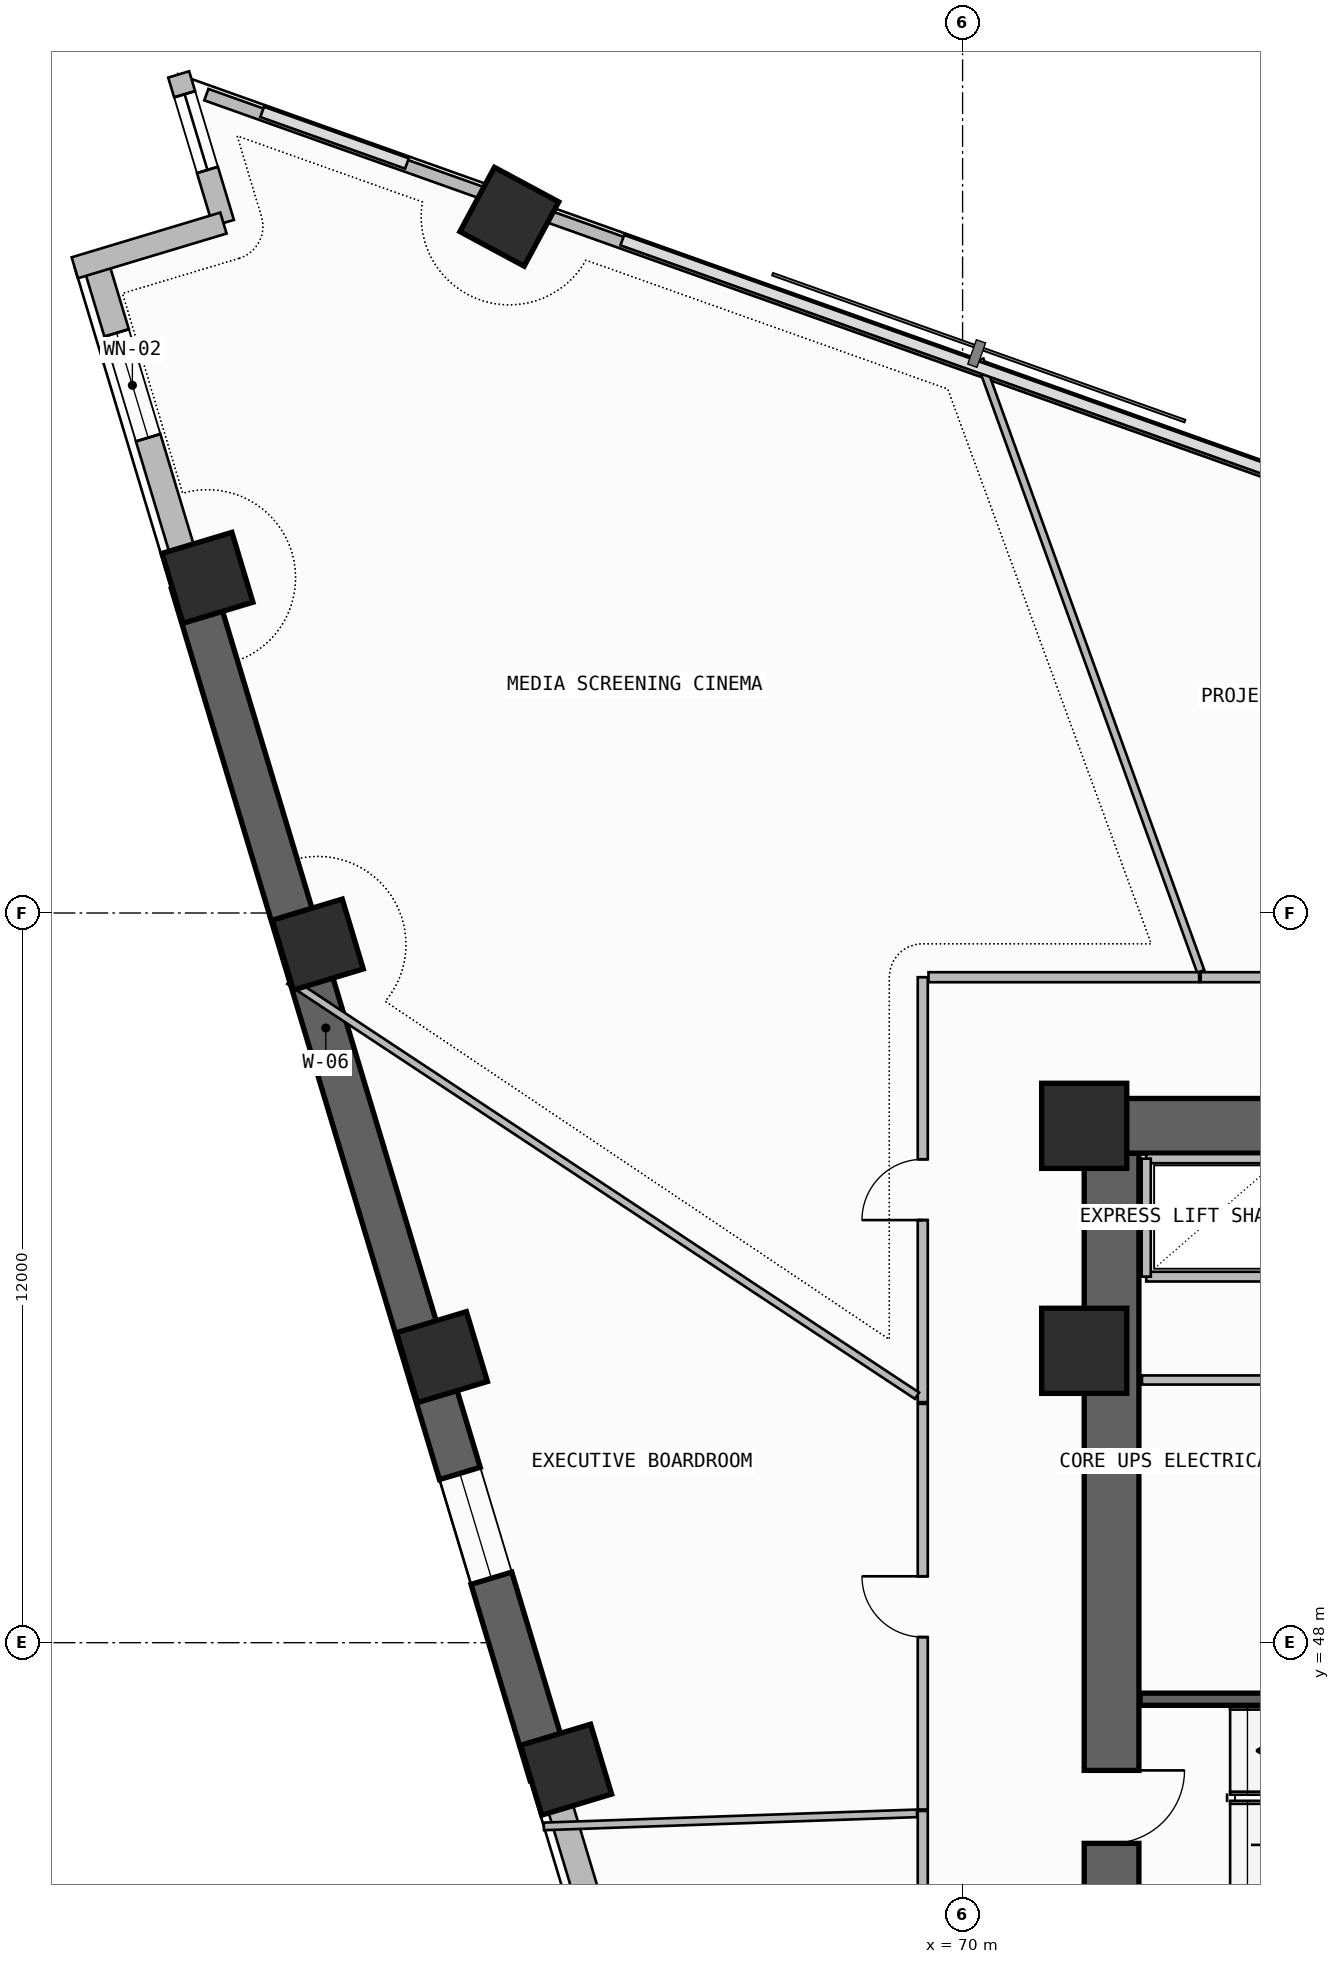
"""IFC4 building model, lengths in metres.
Left out: names, types, materials, properties, quantities, classifications, styles, units other than length and angle.
Written with IfcOpenShell. Run it as: python <this file> out.ifc"""

import sys

from ifc_helpers import new_model, si_unit, direction, frame, frame_2d, origin, origin_2d, place, context, subcontext, project, spatial, rectangle, extrude, element, fill, save


model = new_model("IFC4")
c1 = context("Model", 3, precision=1e-05, world=origin(), true_north=direction((0.0, 1.0)))
c2 = subcontext(c1, "Body", "Model", "MODEL_VIEW")
j1 = project(units=[si_unit("LENGTHUNIT", "METRE"), si_unit("PLANEANGLEUNIT", "RADIAN")], contexts=[c1])
p1 = place(None, origin())
s1 = spatial("IfcSite", under=j1, at=p1, CompositionType="ELEMENT")
p2 = place(p1, origin())
s2 = spatial("IfcBuilding", under=s1, at=p2, CompositionType="ELEMENT")
p3 = place(p2, frame((0.0, 0.0, 143.1)))
s3 = spatial("IfcBuildingStorey", under=s2, at=p3, CompositionType="ELEMENT", Elevation=143.1)
p4 = place(p3, frame((72.45, 43.35, -0.26), z_axis=(0.0, 0.0, 1.0), x_axis=(0.0, 1.0, 0.0)))
e1 = element("IfcWall", 1, at=p4, inside=s3, PredefinedType="SHEAR", context=c2, shape_type="SweptSolid", body=[
    extrude(rectangle(XDim=12.7, YDim=0.9, at=frame_2d((6.35, 0.0))), origin(), (0.0, 0.0, 1.0), 3.6),
])
p5 = place(p4, frame((1.35, 0.0, 0.26)))
e2 = element("IfcOpeningElement", 2, at=p5, cuts=e1, PredefinedType="OPENING", context=c2, shape_type="SweptSolid", body=[
    extrude(rectangle(XDim=1.2, YDim=2.2, at=frame_2d((0.6, 1.1))), frame((0.0, 0.46, 0.0), z_axis=(0.0, -1.0, 0.0), x_axis=(1.0, 0.0, 0.0)), (0.0, 0.0, 1.0), 0.92),
])
p6 = place(p3, frame((72.0, 56.5, -0.26), z_axis=(0.0, 0.0, 1.0), x_axis=(1.0, 0.0, 0.0)))
e3 = element("IfcWall", 3, at=p6, inside=s3, PredefinedType="SHEAR", context=c2, shape_type="SweptSolid", body=[
    extrude(rectangle(XDim=13.9, YDim=0.9, at=frame_2d((6.95, 0.0))), origin(), (0.0, 0.0, 1.0), 3.6),
])
for number, where, z_axis, x_axis in (
    (4, (72.0, 52.8, 0.0), (0.0, 0.0, 1.0), (1.0, 0.0, 0.0)),
    (5, (72.0, 56.5, 0.0), (0.0, 0.0, 1.0), (1.0, 0.0, 0.0)),
):
    element("IfcColumn", number, at=place(p3, frame(where, z_axis=z_axis, x_axis=x_axis)), inside=s3, PredefinedType="COLUMN", context=c2, shape_type="SweptSolid", body=[
        extrude(rectangle(XDim=1.4, YDim=1.4, at=origin_2d()), origin(), (0.0, 0.0, 1.0), 3.6),
    ])
for number, where, z_axis, x_axis in (
    (6, (62.545, 71.45, 0.0), (0.0, 0.0, 1.0), (0.473, 0.881, 0.0)),
    (7, (57.581, 65.512, 0.0), (0.0, 0.0, 1.0), (-0.288, 0.958, 0.0)),
    (8, (59.396, 59.481, 0.0), (0.0, 0.0, 1.0), (-0.288, 0.958, 0.0)),
    (9, (61.438, 52.696, 0.0), (0.0, 0.0, 1.0), (-0.288, 0.958, 0.0)),
    (10, (63.48, 45.912, 0.0), (0.0, 0.0, 1.0), (-0.288, 0.958, 0.0)),
):
    element("IfcColumn", number, at=place(p3, frame(where, z_axis=z_axis, x_axis=x_axis)), inside=s3, PredefinedType="COLUMN", context=c2, shape_type="SweptSolid", body=[
        extrude(rectangle(XDim=1.2, YDim=1.2, at=origin_2d()), origin(), (0.0, 0.0, 1.0), 3.6),
    ])
p7 = place(p3, frame((55.734, 70.711, 0.0), z_axis=(0.0, 0.0, 1.0), x_axis=(0.288221590884, -0.957563739157, 0.0)))
e11 = element("IfcWall", 11, at=p7, inside=s3, PredefinedType="SOLIDWALL", context=c2, shape_type="SweptSolid", body=[
    extrude(rectangle(XDim=5.511, YDim=0.42, at=frame_2d((2.755, 0.0))), origin(), (0.0, 0.0, 1.0), 2.725),
])
p8 = place(p7, frame((1.223, 0.0, 1.2)))
e12 = element("IfcOpeningElement", 12, at=p8, cuts=e11, PredefinedType="OPENING", context=c2, shape_type="SweptSolid", body=[
    extrude(rectangle(XDim=1.8, YDim=0.9, at=frame_2d((0.9, 0.45))), frame((0.0, 0.22, 0.0), z_axis=(0.0, -1.0, 0.0), x_axis=(1.0, 0.0, 0.0)), (0.0, 0.0, 1.0), 0.44),
])
p9 = place(p3, frame((57.323, 65.434, -0.26), z_axis=(0.0, 0.0, 1.0), x_axis=(0.288188159352, -0.957573801234, 0.0)))
e13 = element("IfcWall", 13, at=p9, inside=s3, PredefinedType="SHEAR", context=c2, shape_type="SweptSolid", body=[
    extrude(rectangle(XDim=20.469, YDim=0.7, at=frame_2d((10.234, 0.0))), origin(), (0.0, 0.0, 1.0), 3.6),
])
p10 = place(p9, frame((15.3, 0.0, 1.2)))
e14 = element("IfcOpeningElement", 14, at=p10, cuts=e13, PredefinedType="OPENING", context=c2, shape_type="SweptSolid", body=[
    extrude(rectangle(XDim=1.8, YDim=0.9, at=frame_2d((0.9, 0.45))), frame((0.0, 0.36, 0.0), z_axis=(0.0, -1.0, 0.0), x_axis=(1.0, 0.0, 0.0)), (0.0, 0.0, 1.0), 0.72),
])
p11 = place(p3, frame((63.221, 45.834, 0.0), z_axis=(0.0, 0.0, 1.0), x_axis=(0.288202962273, -0.957569346072, 0.0)))
e15 = element("IfcWall", 15, at=p11, inside=s3, PredefinedType="SOLIDWALL", context=c2, shape_type="SweptSolid", body=[
    extrude(rectangle(XDim=13.384, YDim=0.42, at=frame_2d((6.692, 0.0))), origin(), (0.0, 0.0, 1.0), 2.725),
])
p12 = place(p11, frame((5.517, 0.0, 1.2)))
e16 = element("IfcOpeningElement", 16, at=p12, cuts=e15, PredefinedType="OPENING", context=c2, shape_type="SweptSolid", body=[
    extrude(rectangle(XDim=1.8, YDim=0.9, at=frame_2d((0.9, 0.45))), frame((0.0, 0.22, 0.0), z_axis=(0.0, -1.0, 0.0), x_axis=(1.0, 0.0, 0.0)), (0.0, 0.0, 1.0), 0.44),
])
p13 = place(p3, frame((57.108, 73.79, 0.0), z_axis=(0.0, 0.0, 1.0), x_axis=(0.288198985694, -0.957570542908, 0.0)))
e17 = element("IfcWall", 17, at=p13, inside=s3, PredefinedType="SOLIDWALL", context=c2, shape_type="SweptSolid", body=[
    extrude(rectangle(XDim=2.552, YDim=0.36, at=frame_2d((1.276, 0.0))), origin(), (0.0, 0.0, 1.0), 3.34),
])
p14 = place(p13, frame((0.34, 0.0, 0.45)))
e18 = element("IfcOpeningElement", 18, at=p14, cuts=e17, PredefinedType="OPENING", context=c2, shape_type="SweptSolid", body=[
    extrude(rectangle(XDim=1.3, YDim=2.4, at=frame_2d((0.65, 1.2))), frame((0.0, 0.19, 0.0), z_axis=(0.0, -1.0, 0.0), x_axis=(1.0, 0.0, 0.0)), (0.0, 0.0, 1.0), 0.38),
])
p15 = place(p3, frame((57.843, 71.346, 0.0), z_axis=(0.0, 0.0, 1.0), x_axis=(-0.95757848653, -0.288172590882, 0.0)))
e19 = element("IfcWall", 19, at=p15, inside=s3, PredefinedType="SOLIDWALL", context=c2, shape_type="SweptSolid", body=[
    extrude(rectangle(XDim=2.553, YDim=0.36, at=frame_2d((1.276, 0.0))), origin(), (0.0, 0.0, 1.0), 3.34),
])
p16 = place(p3, frame((89.368, 62.13, 0.0), z_axis=(0.0, 0.0, 1.0), x_axis=(-0.942033439765, 0.335518998515, 0.0)))
e20 = element("IfcWall", 20, at=p16, inside=s3, PredefinedType="PARAPET", context=c2, shape_type="SweptSolid", body=[
    extrude(rectangle(XDim=27.969, YDim=0.2, at=frame_2d((13.985, 0.0))), origin(), (0.0, 0.0, 1.0), 1.15),
])
p17 = place(p3, frame((62.218, 71.801, 0.0), z_axis=(0.0, 0.0, 1.0), x_axis=(-0.942038862895, 0.335503771655, 0.0)))
e21 = element("IfcWall", 21, at=p17, inside=s3, PredefinedType="PARAPET", context=c2, shape_type="SweptSolid", body=[
    extrude(rectangle(XDim=4.942, YDim=0.2, at=frame_2d((2.471, 0.0))), origin(), (0.0, 0.0, 1.0), 1.15),
])
p18 = place(p3, frame((72.92, 47.07, -0.26), z_axis=(0.0, 0.0, 1.0), x_axis=(1.0, 0.0, 0.0)))
e22 = element("IfcWall", 22, at=p18, inside=s3, PredefinedType="SOLIDWALL", context=c2, shape_type="SweptSolid", body=[
    extrude(rectangle(XDim=7.7, YDim=0.2, at=frame_2d((3.85, 0.0))), origin(), (0.0, 0.0, 1.0), 3.6),
])
p19 = place(p3, frame((72.95, 52.32, 0.0), z_axis=(0.0, 0.0, 1.0), x_axis=(1.0, 0.0, 0.0)))
e23 = element("IfcWall", 23, at=p19, inside=s3, PredefinedType="SOLIDWALL", context=c2, shape_type="SweptSolid", body=[
    extrude(rectangle(XDim=3.33, YDim=0.15, at=frame_2d((1.665, 0.0))), origin(), (0.0, 0.0, 1.0), 3.34),
])
p20 = place(p3, frame((73.02, 54.02, 0.0), z_axis=(0.0, 0.0, 1.0), x_axis=(1.0, 0.0, 0.0)))
e24 = element("IfcWall", 24, at=p20, inside=s3, PredefinedType="SOLIDWALL", context=c2, shape_type="SweptSolid", body=[
    extrude(rectangle(XDim=12.08, YDim=0.16, at=frame_2d((6.04, 0.0))), origin(), (0.0, 0.0, 1.0), 3.34),
])
p21 = place(p3, frame((73.02, 55.96, 0.0), z_axis=(0.0, 0.0, 1.0), x_axis=(1.0, 0.0, 0.0)))
e25 = element("IfcWall", 25, at=p21, inside=s3, PredefinedType="SOLIDWALL", context=c2, shape_type="SweptSolid", body=[
    extrude(rectangle(XDim=3.5, YDim=0.15, at=frame_2d((1.75, 0.0))), origin(), (0.0, 0.0, 1.0), 3.34),
])
p22 = place(p3, frame((73.02, 54.02, 0.0), z_axis=(0.0, 0.0, 1.0), x_axis=(0.0, 1.0, 0.0)))
e26 = element("IfcWall", 26, at=p22, inside=s3, PredefinedType="PLUMBINGWALL", context=c2, shape_type="SweptSolid", body=[
    extrude(rectangle(XDim=1.94, YDim=0.15, at=frame_2d((0.97, 0.0))), origin(), (0.0, 0.0, 1.0), 3.34),
])
p23 = place(p3, frame((69.345, 45.233, 0.0), z_axis=(0.0, 0.0, 1.0), x_axis=(0.0, -1.0, 0.0)))
e27 = element("IfcWall", 27, at=p23, inside=s3, PredefinedType="PARTITIONING", context=c2, shape_type="SweptSolid", body=[
    extrude(rectangle(XDim=7.045, YDim=0.165, at=frame_2d((3.522, 0.0))), origin(), (0.0, 0.0, 1.0), 3.34),
])
p24 = place(p23, frame((3.022, 0.0, 0.0)))
e28 = element("IfcOpeningElement", 28, at=p24, cuts=e27, PredefinedType="OPENING", context=c2, shape_type="SweptSolid", body=[
    extrude(rectangle(XDim=1.0, YDim=2.2, at=frame_2d((0.5, 1.1))), frame((0.0, 0.093, 0.0), z_axis=(0.0, -1.0, 0.0), x_axis=(1.0, 0.0, 0.0)), (0.0, 0.0, 1.0), 0.185),
])
p25 = place(p3, frame((63.113, 44.979, 0.0), z_axis=(0.0, 0.0, 1.0), x_axis=(0.999389215119, 0.034945624954, 0.0)))
e29 = element("IfcWall", 29, at=p25, inside=s3, PredefinedType="PARTITIONING", context=c2, shape_type="SweptSolid", body=[
    extrude(rectangle(XDim=6.141, YDim=0.125, at=frame_2d((3.07, 0.0))), origin(), (0.0, 0.0, 1.0), 3.34),
])
p26 = place(p3, frame((82.576, 58.944, 0.0), z_axis=(0.0, 0.0, 1.0), x_axis=(-1.0, 0.0, 0.0)))
e30 = element("IfcWall", 30, at=p26, inside=s3, PredefinedType="PARTITIONING", context=c2, shape_type="SweptSolid", body=[
    extrude(rectangle(XDim=8.66, YDim=0.165, at=frame_2d((4.33, 0.0))), origin(), (0.0, 0.0, 1.0), 3.34),
])
p27 = place(p26, frame((3.83, 0.0, 0.0)))
e31 = element("IfcOpeningElement", 31, at=p27, cuts=e30, PredefinedType="OPENING", context=c2, shape_type="SweptSolid", body=[
    extrude(rectangle(XDim=1.0, YDim=2.2, at=frame_2d((0.5, 1.1))), frame((0.0, 0.093, 0.0), z_axis=(0.0, -1.0, 0.0), x_axis=(1.0, 0.0, 0.0)), (0.0, 0.0, 1.0), 0.185),
])
p28 = place(p3, frame((73.917, 59.039, 0.0), z_axis=(0.0, 0.0, 1.0), x_axis=(-0.33969494852, 0.940535667559, 0.0)))
e32 = element("IfcWall", 32, at=p28, inside=s3, PredefinedType="PARTITIONING", context=c2, shape_type="SweptSolid", body=[
    extrude(rectangle(XDim=10.695, YDim=0.125, at=frame_2d((5.348, 0.0))), origin(), (0.0, 0.0, 1.0), 3.34),
])
p29 = place(p3, frame((69.345, 58.944, 0.0), z_axis=(0.0, 0.0, 1.0), x_axis=(0.0, -1.0, 0.0)))
e33 = element("IfcWall", 33, at=p29, inside=s3, PredefinedType="PARTITIONING", context=c2, shape_type="SweptSolid", body=[
    extrude(rectangle(XDim=6.988, YDim=0.165, at=frame_2d((3.494, 0.0))), origin(), (0.0, 0.0, 1.0), 2.725),
])
p30 = place(p29, frame((2.994, 0.0, 0.0)))
e34 = element("IfcOpeningElement", 34, at=p30, cuts=e33, PredefinedType="OPENING", context=c2, shape_type="SweptSolid", body=[
    extrude(rectangle(XDim=1.0, YDim=2.2, at=frame_2d((0.5, 1.1))), frame((0.0, 0.093, 0.0), z_axis=(0.0, -1.0, 0.0), x_axis=(1.0, 0.0, 0.0)), (0.0, 0.0, 1.0), 0.185),
])
p31 = place(p3, frame((73.891, 58.944, 0.0), z_axis=(0.0, 0.0, 1.0), x_axis=(-1.0, 0.0, 0.0)))
e35 = element("IfcWall", 35, at=p31, inside=s3, PredefinedType="PARTITIONING", context=c2, shape_type="SweptSolid", body=[
    extrude(rectangle(XDim=4.451, YDim=0.165, at=frame_2d((2.226, 0.0))), origin(), (0.0, 0.0, 1.0), 2.725),
])
p32 = place(p3, frame((69.25, 52.062, 0.0), z_axis=(0.0, 0.0, 1.0), x_axis=(-0.834214251914, 0.551440460887, 0.0)))
e36 = element("IfcWall", 36, at=p32, inside=s3, PredefinedType="PARTITIONING", context=c2, shape_type="SweptSolid", body=[
    extrude(rectangle(XDim=12.374, YDim=0.125, at=frame_2d((6.187, 0.0))), origin(), (0.0, 0.0, 1.0), 2.725),
])
p33 = place(p3, frame((69.345, 51.927, 0.0), z_axis=(0.0, 0.0, 1.0), x_axis=(0.0, -1.0, 0.0)))
e37 = element("IfcWall", 37, at=p33, inside=s3, PredefinedType="PARTITIONING", context=c2, shape_type="SweptSolid", body=[
    extrude(rectangle(XDim=6.67, YDim=0.165, at=frame_2d((3.335, 0.0))), origin(), (0.0, 0.0, 1.0), 2.725),
])
p34 = place(p33, frame((2.835, 0.0, 0.0)))
e38 = element("IfcOpeningElement", 38, at=p34, cuts=e37, PredefinedType="OPENING", context=c2, shape_type="SweptSolid", body=[
    extrude(rectangle(XDim=1.0, YDim=2.2, at=frame_2d((0.5, 1.1))), frame((0.0, 0.093, 0.0), z_axis=(0.0, -1.0, 0.0), x_axis=(1.0, 0.0, 0.0)), (0.0, 0.0, 1.0), 0.185),
])
p35 = place(p8, origin())
e39 = element("IfcWindow", 39, at=p35, inside=s3, PartitioningType="SINGLE_PANEL", PredefinedType="WINDOW", context=c2, shape_type="SweptSolid", body=[
    extrude(rectangle(XDim=1.8, YDim=0.9, at=frame_2d((0.9, 0.45))), frame((0.0, 0.03, 0.0), z_axis=(0.0, -1.0, 0.0), x_axis=(1.0, 0.0, 0.0)), (0.0, 0.0, 1.0), 0.06),
])
fill(e12, e39)
p36 = place(p10, origin())
e40 = element("IfcWindow", 40, at=p36, inside=s3, PartitioningType="SINGLE_PANEL", PredefinedType="WINDOW", context=c2, shape_type="SweptSolid", body=[
    extrude(rectangle(XDim=1.8, YDim=0.9, at=frame_2d((0.9, 0.45))), frame((0.0, 0.03, 0.0), z_axis=(0.0, -1.0, 0.0), x_axis=(1.0, 0.0, 0.0)), (0.0, 0.0, 1.0), 0.06),
])
fill(e14, e40)
p37 = place(p14, origin())
e41 = element("IfcWindow", 41, at=p37, inside=s3, PartitioningType="SINGLE_PANEL", PredefinedType="WINDOW", context=c2, shape_type="SweptSolid", body=[
    extrude(rectangle(XDim=1.3, YDim=2.4, at=frame_2d((0.65, 1.2))), frame((0.0, 0.03, 0.0), z_axis=(0.0, -1.0, 0.0), x_axis=(1.0, 0.0, 0.0)), (0.0, 0.0, 1.0), 0.06),
])
fill(e18, e41)
p38 = place(p5, frame((1.2, 0.0, 0.0), z_axis=(0.0, 0.0, 1.0), x_axis=(-1.0, 0.0, 0.0)))
e42 = element("IfcDoor", 42, at=p38, inside=s3, OperationType="SINGLE_SWING_LEFT", PredefinedType="USERDEFINED", context=c2, shape_type="SweptSolid", body=[
    extrude(rectangle(XDim=1.2, YDim=2.2, at=frame_2d((0.6, 1.1))), frame((0.0, 0.025, 0.0), z_axis=(0.0, -1.0, 0.0), x_axis=(1.0, 0.0, 0.0)), (0.0, 0.0, 1.0), 0.05),
])
fill(e2, e42)
p39 = place(p30, frame((1.0, 0.0, 0.0), z_axis=(0.0, 0.0, 1.0), x_axis=(-1.0, 0.0, 0.0)))
e43 = element("IfcDoor", 43, at=p39, inside=s3, OperationType="SINGLE_SWING_LEFT", PredefinedType="DOOR", context=c2, shape_type="SweptSolid", body=[
    extrude(rectangle(XDim=1.0, YDim=2.2, at=frame_2d((0.5, 1.1))), frame((0.0, 0.025, 0.0), z_axis=(0.0, -1.0, 0.0), x_axis=(1.0, 0.0, 0.0)), (0.0, 0.0, 1.0), 0.05),
])
fill(e34, e43)
p40 = place(p34, frame((1.0, 0.0, 0.0), z_axis=(0.0, 0.0, 1.0), x_axis=(-1.0, 0.0, 0.0)))
e44 = element("IfcDoor", 44, at=p40, inside=s3, OperationType="SINGLE_SWING_RIGHT", PredefinedType="DOOR", context=c2, shape_type="SweptSolid", body=[
    extrude(rectangle(XDim=1.0, YDim=2.2, at=frame_2d((0.5, 1.1))), frame((0.0, 0.025, 0.0), z_axis=(0.0, -1.0, 0.0), x_axis=(1.0, 0.0, 0.0)), (0.0, 0.0, 1.0), 0.05),
])
fill(e38, e44)
save(model, sys.argv[1])
